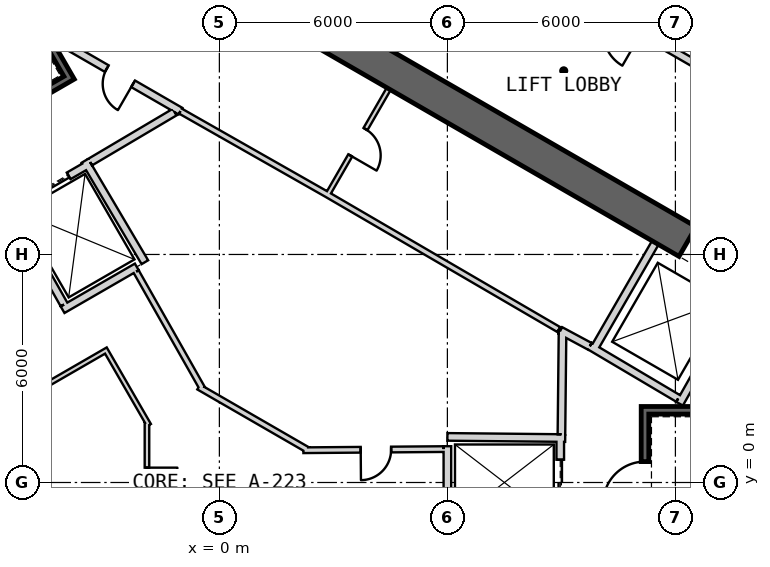
"""IFC4 building model, lengths in metres.
Left out: names, types, materials, properties, quantities, classifications, styles, units other than length and angle.
Written with IfcOpenShell. Run it as: python <this file> out.ifc"""

import sys

from ifc_helpers import new_model, si_unit, direction, frame, frame_2d, origin, place, context, subcontext, project, spatial, rectangle, extrude, element, fill, save


model = new_model("IFC4")
c1 = context("Model", 3, precision=1e-05, world=origin(), true_north=direction((0.0, 1.0)))
c2 = subcontext(c1, "Body", "Model", "MODEL_VIEW")
j1 = project(units=[si_unit("LENGTHUNIT", "METRE"), si_unit("PLANEANGLEUNIT", "RADIAN")], contexts=[c1])
p1 = place(None, origin())
s1 = spatial("IfcSite", under=j1, at=p1, CompositionType="ELEMENT")
p2 = place(p1, origin())
s2 = spatial("IfcBuilding", under=s1, at=p2, CompositionType="ELEMENT")
p3 = place(p2, frame((0.0, 0.0, 193.2)))
s3 = spatial("IfcBuildingStorey", under=s2, at=p3, CompositionType="ELEMENT", Elevation=193.2)
p4 = place(p3, frame((19.475, 2.208, 0.0), z_axis=(0.0, 0.0, 1.0), x_axis=(-0.866028369851, 0.499994862586, 0.0)))
e1 = element("IfcWall", 1, at=p4, inside=s3, PredefinedType="SHEAR", context=c2, shape_type="SweptSolid", body=[
    extrude(rectangle(XDim=31.523, YDim=0.9, at=frame_2d((15.762, 0.0))), origin(), (0.0, 0.0, 1.0), 4.0),
])
p5 = place(p4, frame((7.062, 0.0, 0.0)))
e2 = element("IfcOpeningElement", 2, at=p5, cuts=e1, PredefinedType="OPENING", context=c2, shape_type="SweptSolid", body=[
    extrude(rectangle(XDim=1.2, YDim=2.4, at=frame_2d((0.6, 1.2))), frame((0.0, 0.46, 0.0), z_axis=(0.0, -1.0, 0.0), x_axis=(1.0, 0.0, 0.0)), (0.0, 0.0, 1.0), 0.92),
])
p6 = place(p4, frame((3.612, 0.0, 0.0)))
e3 = element("IfcOpeningElement", 3, at=p6, cuts=e1, PredefinedType="OPENING", context=c2, shape_type="SweptSolid", body=[
    extrude(rectangle(XDim=1.2, YDim=2.4, at=frame_2d((0.6, 1.2))), frame((0.0, 0.46, 0.0), z_axis=(0.0, -1.0, 0.0), x_axis=(1.0, 0.0, 0.0)), (0.0, 0.0, 1.0), 0.92),
])
p7 = place(p4, frame((26.712, 0.0, 0.0)))
e4 = element("IfcOpeningElement", 4, at=p7, cuts=e1, PredefinedType="OPENING", context=c2, shape_type="SweptSolid", body=[
    extrude(rectangle(XDim=1.2, YDim=2.4, at=frame_2d((0.6, 1.2))), frame((0.0, 0.46, 0.0), z_axis=(0.0, -1.0, 0.0), x_axis=(1.0, 0.0, 0.0)), (0.0, 0.0, 1.0), 0.92),
])
p8 = place(p3, frame((9.847, 3.495, 0.0), z_axis=(0.0, 0.0, 1.0), x_axis=(0.499984717929, 0.866034226713, 0.0)))
e5 = element("IfcWall", 5, at=p8, inside=s3, PredefinedType="PLUMBINGWALL", context=c2, shape_type="SweptSolid", body=[
    extrude(rectangle(XDim=3.25, YDim=0.2, at=frame_2d((1.625, 0.0))), origin(), (0.0, 0.0, 1.0), 3.7),
])
p9 = place(p3, frame((12.11, 2.073, 0.0), z_axis=(0.0, 0.0, 1.0), x_axis=(0.49196600604, 0.870614408852, 0.0)))
e6 = element("IfcWall", 6, at=p9, inside=s3, PredefinedType="PLUMBINGWALL", context=c2, shape_type="SweptSolid", body=[
    extrude(rectangle(XDim=3.35, YDim=0.2, at=frame_2d((1.675, 0.0))), origin(), (0.0, 0.0, 1.0), 3.7),
])
p10 = place(p3, frame((12.073, 2.211, 0.0), z_axis=(0.0, 0.0, 1.0), x_axis=(-0.860414880418, 0.509594185166, 0.0)))
e7 = element("IfcWall", 7, at=p10, inside=s3, PredefinedType="PLUMBINGWALL", context=c2, shape_type="SweptSolid", body=[
    extrude(rectangle(XDim=2.7, YDim=0.2, at=frame_2d((1.35, 0.0))), origin(), (0.0, 0.0, 1.0), 3.7),
])
p11 = place(p3, frame((19.2, 1.9, -0.3), z_axis=(0.0, 0.0, 1.0), x_axis=(-1.0, 0.0, 0.0)))
e8 = element("IfcWall", 8, at=p11, inside=s3, PredefinedType="SHEAR", context=c2, shape_type="SweptSolid", body=[
    extrude(rectangle(XDim=8.1, YDim=0.2, at=frame_2d((4.05, 0.0))), origin(), (0.0, 0.0, 1.0), 4.0),
])
p12 = place(p3, frame((11.2, -1.8, -0.3), z_axis=(0.0, 0.0, 1.0), x_axis=(0.0, 1.0, 0.0)))
e9 = element("IfcWall", 9, at=p12, inside=s3, PredefinedType="SHEAR", context=c2, shape_type="SweptSolid", body=[
    extrude(rectangle(XDim=3.6, YDim=0.2, at=frame_2d((1.8, 0.0))), origin(), (0.0, 0.0, 1.0), 4.0),
])
p13 = place(p12, frame((1.25, 0.0, 0.3)))
e10 = element("IfcOpeningElement", 10, at=p13, cuts=e9, PredefinedType="OPENING", context=c2, shape_type="SweptSolid", body=[
    extrude(rectangle(XDim=1.1, YDim=2.1, at=frame_2d((0.55, 1.05))), frame((0.0, 0.11, 0.0), z_axis=(0.0, -1.0, 0.0), x_axis=(1.0, 0.0, 0.0)), (0.0, 0.0, 1.0), 0.22),
])
p14 = place(p3, frame((8.97, 1.2, 0.0), z_axis=(0.0, 0.0, 1.0), x_axis=(0.0, -1.0, 0.0)))
e11 = element("IfcWall", 11, at=p14, inside=s3, PredefinedType="PLUMBINGWALL", context=c2, shape_type="SweptSolid", body=[
    extrude(rectangle(XDim=2.4, YDim=0.2, at=frame_2d((1.2, 0.0))), origin(), (0.0, 0.0, 1.0), 3.7),
])
p15 = place(p14, frame((0.6, 0.0, 0.0)))
e12 = element("IfcOpeningElement", 12, at=p15, cuts=e11, PredefinedType="OPENING", context=c2, shape_type="SweptSolid", body=[
    extrude(rectangle(XDim=1.2, YDim=2.4, at=frame_2d((0.6, 1.2))), frame((0.0, 0.11, 0.0), z_axis=(0.0, -1.0, 0.0), x_axis=(1.0, 0.0, 0.0)), (0.0, 0.0, 1.0), 0.22),
])
p16 = place(p3, frame((6.0, 1.2, 0.0), z_axis=(0.0, 0.0, 1.0), x_axis=(0.999949988, -0.010001074852, 0.0)))
e13 = element("IfcWall", 13, at=p16, inside=s3, PredefinedType="PLUMBINGWALL", context=c2, shape_type="SweptSolid", body=[
    extrude(rectangle(XDim=3.1, YDim=0.2, at=frame_2d((1.55, 0.0))), origin(), (0.0, 0.0, 1.0), 3.7),
])
p17 = place(p3, frame((6.0, -1.1, 0.0), z_axis=(0.0, 0.0, 1.0), x_axis=(0.0, 1.0, 0.0)))
e14 = element("IfcWall", 14, at=p17, inside=s3, PredefinedType="PLUMBINGWALL", context=c2, shape_type="SweptSolid", body=[
    extrude(rectangle(XDim=2.055, YDim=0.2, at=frame_2d((1.027, 0.0))), origin(), (0.0, 0.0, 1.0), 3.7),
])
p18 = place(p3, frame((-7.854, 17.405, -0.3), z_axis=(0.0, 0.0, 1.0), x_axis=(0.499997992926, -0.866026562566, 0.0)))
e15 = element("IfcWall", 15, at=p18, inside=s3, PredefinedType="SHEAR", context=c2, shape_type="SweptSolid", body=[
    extrude(rectangle(XDim=7.9, YDim=0.2, at=frame_2d((3.95, 0.0))), origin(), (0.0, 0.0, 1.0), 4.0),
])
p19 = place(p3, frame((-7.159, 8.8, -0.3), z_axis=(0.0, 0.0, 1.0), x_axis=(0.866047807691, 0.499961193289, 0.0)))
e16 = element("IfcWall", 16, at=p19, inside=s3, PredefinedType="SHEAR", context=c2, shape_type="SweptSolid", body=[
    extrude(rectangle(XDim=3.6, YDim=0.2, at=frame_2d((1.8, 0.0))), origin(), (0.0, 0.0, 1.0), 4.0),
])
p20 = place(p19, frame((1.25, 0.0, 0.3)))
e17 = element("IfcOpeningElement", 17, at=p20, cuts=e16, PredefinedType="OPENING", context=c2, shape_type="SweptSolid", body=[
    extrude(rectangle(XDim=1.1, YDim=2.1, at=frame_2d((0.55, 1.05))), frame((0.0, 0.11, 0.0), z_axis=(0.0, -1.0, 0.0), x_axis=(1.0, 0.0, 0.0)), (0.0, 0.0, 1.0), 0.22),
])
p21 = place(p3, frame((-5.524, 7.168, 0.0), z_axis=(0.0, 0.0, 1.0), x_axis=(0.866024647952, 0.500001309137, 0.0)))
e18 = element("IfcWall", 18, at=p21, inside=s3, PredefinedType="PLUMBINGWALL", context=c2, shape_type="SweptSolid", body=[
    extrude(rectangle(XDim=2.4, YDim=0.2, at=frame_2d((1.2, 0.0))), origin(), (0.0, 0.0, 1.0), 3.7),
])
p22 = place(p21, frame((0.6, 0.0, 0.0)))
e19 = element("IfcOpeningElement", 19, at=p22, cuts=e18, PredefinedType="OPENING", context=c2, shape_type="SweptSolid", body=[
    extrude(rectangle(XDim=1.2, YDim=2.4, at=frame_2d((0.6, 1.2))), frame((0.0, 0.11, 0.0), z_axis=(0.0, -1.0, 0.0), x_axis=(1.0, 0.0, 0.0)), (0.0, 0.0, 1.0), 0.22),
])
p23 = place(p3, frame((-3.538, 8.465, 0.0), z_axis=(0.0, 0.0, 1.0), x_axis=(0.508647062354, -0.860975125052, 0.0)))
e20 = element("IfcWall", 20, at=p23, inside=s3, PredefinedType="PLUMBINGWALL", context=c2, shape_type="SweptSolid", body=[
    extrude(rectangle(XDim=3.1, YDim=0.2, at=frame_2d((1.55, 0.0))), origin(), (0.0, 0.0, 1.0), 3.7),
])
p24 = place(p3, frame((-2.173, 5.673, 0.0), z_axis=(0.0, 0.0, 1.0), x_axis=(-0.866028691075, -0.499994306202, 0.0)))
e21 = element("IfcWall", 21, at=p24, inside=s3, PredefinedType="PLUMBINGWALL", context=c2, shape_type="SweptSolid", body=[
    extrude(rectangle(XDim=2.254, YDim=0.2, at=frame_2d((1.127, 0.0))), origin(), (0.0, 0.0, 1.0), 3.7),
])
p25 = place(p3, frame((-5.562, 7.296, 0.0), z_axis=(0.0, 0.0, 1.0), x_axis=(0.49134651263, -0.870964180966, 0.0)))
e22 = element("IfcWall", 22, at=p25, inside=s3, PredefinedType="PLUMBINGWALL", context=c2, shape_type="SweptSolid", body=[
    extrude(rectangle(XDim=3.0, YDim=0.2, at=frame_2d((1.5, 0.0))), origin(), (0.0, 0.0, 1.0), 3.7),
])
p26 = place(p3, frame((4.457, 10.359, 0.0), z_axis=(0.0, 0.0, 1.0), x_axis=(-0.500017246033, -0.866015446554, 0.0)))
e23 = element("IfcWall", 23, at=p26, inside=s3, PredefinedType="PARTITIONING", context=c2, shape_type="SweptSolid", body=[
    extrude(rectangle(XDim=3.25, YDim=0.12, at=frame_2d((1.625, 0.0))), origin(), (0.0, 0.0, 1.0), 3.7),
])
p27 = place(p26, frame((1.225, 0.0, 0.0)))
e24 = element("IfcOpeningElement", 24, at=p27, cuts=e23, PredefinedType="OPENING", context=c2, shape_type="SweptSolid", body=[
    extrude(rectangle(XDim=0.8, YDim=2.1, at=frame_2d((0.4, 1.05))), frame((0.0, 0.07, 0.0), z_axis=(0.0, -1.0, 0.0), x_axis=(1.0, 0.0, 0.0)), (0.0, 0.0, 1.0), 0.14),
])
p28 = place(p3, frame((8.974, 3.999, 0.0), z_axis=(0.0, 0.0, 1.0), x_axis=(0.880917147855, -0.473270513147, 0.0)))
e25 = element("IfcWall", 25, at=p28, inside=s3, PredefinedType="PARTITIONING", context=c2, shape_type="SweptSolid", body=[
    extrude(rectangle(XDim=0.878, YDim=0.2, at=frame_2d((0.439, 0.0))), origin(), (0.0, 0.0, 1.0), 3.7),
])
p29 = place(p3, frame((8.931, 4.024, 0.0), z_axis=(0.0, 0.0, 1.0), x_axis=(-0.863936620311, 0.50360055211, 0.0)))
e26 = element("IfcWall", 26, at=p29, inside=s3, PredefinedType="PLUMBINGWALL", context=c2, shape_type="SweptSolid", body=[
    extrude(rectangle(XDim=7.072, YDim=0.15, at=frame_2d((3.536, 0.0))), origin(), (0.0, 0.0, 1.0), 3.7),
])
p30 = place(p3, frame((-4.296, 11.66, 0.0), z_axis=(0.0, 0.0, 1.0), x_axis=(0.866027389382, -0.499996560828, 0.0)))
e27 = element("IfcWall", 27, at=p30, inside=s3, PredefinedType="PARTITIONING", context=c2, shape_type="SweptSolid", body=[
    extrude(rectangle(XDim=3.778, YDim=0.2, at=frame_2d((1.889, 0.0))), origin(), (0.0, 0.0, 1.0), 3.7),
])
p31 = place(p30, frame((1.539, 0.0, 0.0)))
e28 = element("IfcOpeningElement", 28, at=p31, cuts=e27, PredefinedType="OPENING", context=c2, shape_type="SweptSolid", body=[
    extrude(rectangle(XDim=0.8, YDim=2.1, at=frame_2d((0.4, 1.05))), frame((0.0, 0.11, 0.0), z_axis=(0.0, -1.0, 0.0), x_axis=(1.0, 0.0, 0.0)), (0.0, 0.0, 1.0), 0.22),
])
p32 = place(p3, frame((2.821, 7.586, 0.0), z_axis=(0.0, 0.0, 1.0), x_axis=(-0.869355227283, 0.494187706035, 0.0)))
e29 = element("IfcWall", 29, at=p32, inside=s3, PredefinedType="PLUMBINGWALL", context=c2, shape_type="SweptSolid", body=[
    extrude(rectangle(XDim=4.423, YDim=0.15, at=frame_2d((2.211, 0.0))), origin(), (0.0, 0.0, 1.0), 3.7),
])
p33 = place(p3, frame((9.001, 1.27, 0.0), z_axis=(0.0, 0.0, 1.0), x_axis=(0.010747252091, 0.999942246619, 0.0)))
e30 = element("IfcWall", 30, at=p33, inside=s3, PredefinedType="PARTITIONING", context=c2, shape_type="SweptSolid", body=[
    extrude(rectangle(XDim=2.726, YDim=0.2, at=frame_2d((1.363, 0.0))), origin(), (0.0, 0.0, 1.0), 3.7),
])
p34 = place(p3, frame((-1.179, 9.745, 0.0), z_axis=(0.0, 0.0, 1.0), x_axis=(-0.860630814782, -0.509229418482, 0.0)))
e31 = element("IfcWall", 31, at=p34, inside=s3, PredefinedType="PARTITIONING", context=c2, shape_type="SweptSolid", body=[
    extrude(rectangle(XDim=2.582, YDim=0.2, at=frame_2d((1.291, 0.0))), origin(), (0.0, 0.0, 1.0), 3.7),
])
p35 = place(p3, frame((2.211, 0.849, 0.0), z_axis=(0.0, 0.0, 1.0), x_axis=(0.999967410175, 0.00807332566, 0.0)))
e32 = element("IfcWall", 32, at=p35, inside=s3, PredefinedType="PLUMBINGWALL", context=c2, shape_type="SweptSolid", body=[
    extrude(rectangle(XDim=3.689, YDim=0.15, at=frame_2d((1.845, 0.0))), origin(), (0.0, 0.0, 1.0), 3.7),
])
p36 = place(p35, frame((1.508, 0.0, 0.0)))
e33 = element("IfcOpeningElement", 33, at=p36, cuts=e32, PredefinedType="OPENING", context=c2, shape_type="SweptSolid", body=[
    extrude(rectangle(XDim=0.8, YDim=2.1, at=frame_2d((0.4, 1.05))), frame((0.0, 0.085, 0.0), z_axis=(0.0, -1.0, 0.0), x_axis=(1.0, 0.0, 0.0)), (0.0, 0.0, 1.0), 0.17),
])
p37 = place(p3, frame((-0.543, 2.514, 0.0), z_axis=(0.0, 0.0, 1.0), x_axis=(0.866042846705, -0.499969786758, 0.0)))
e34 = element("IfcWall", 34, at=p37, inside=s3, PredefinedType="PLUMBINGWALL", context=c2, shape_type="SweptSolid", body=[
    extrude(rectangle(XDim=3.304, YDim=0.15, at=frame_2d((1.652, 0.0))), origin(), (0.0, 0.0, 1.0), 3.7),
])
p38 = place(p3, frame((-2.189, 5.549, 0.0), z_axis=(0.0, 0.0, 1.0), x_axis=(0.49303694679, -0.870008373006, 0.0)))
e35 = element("IfcWall", 35, at=p38, inside=s3, PredefinedType="PLUMBINGWALL", context=c2, shape_type="SweptSolid", body=[
    extrude(rectangle(XDim=3.538, YDim=0.15, at=frame_2d((1.769, 0.0))), origin(), (0.0, 0.0, 1.0), 3.7),
])
p39 = place(p3, frame((-2.934, 3.502, 0.0), z_axis=(0.0, 0.0, 1.0), x_axis=(-0.866039121236, -0.499976239924, 0.0)))
e36 = element("IfcWall", 36, at=p39, inside=s3, PredefinedType="PARTITIONING", context=c2, shape_type="SweptSolid", body=[
    extrude(rectangle(XDim=1.971, YDim=0.12, at=frame_2d((0.985, 0.0))), origin(), (0.0, 0.0, 1.0), 3.7),
])
p40 = place(p3, frame((-1.853, 1.51, 0.0), z_axis=(0.0, 0.0, 1.0), x_axis=(-0.499984350684, 0.866034438732, 0.0)))
e37 = element("IfcWall", 37, at=p40, inside=s3, PredefinedType="PARTITIONING", context=c2, shape_type="SweptSolid", body=[
    extrude(rectangle(XDim=2.206, YDim=0.12, at=frame_2d((1.103, 0.0))), origin(), (0.0, 0.0, 1.0), 3.7),
])
p41 = place(p3, frame((-1.905, -1.704, 0.0), z_axis=(0.0, 0.0, 1.0), x_axis=(0.0, 1.0, 0.0)))
e38 = element("IfcWall", 38, at=p41, inside=s3, PredefinedType="PARTITIONING", context=c2, shape_type="SweptSolid", body=[
    extrude(rectangle(XDim=3.285, YDim=0.12, at=frame_2d((1.643, 0.0))), origin(), (0.0, 0.0, 1.0), 3.7),
])
p42 = place(p41, frame((1.295, 0.0, 0.0)))
e39 = element("IfcOpeningElement", 39, at=p42, cuts=e38, PredefinedType="OPENING", context=c2, shape_type="SweptSolid", body=[
    extrude(rectangle(XDim=0.8, YDim=2.1, at=frame_2d((0.4, 1.05))), frame((0.0, 0.07, 0.0), z_axis=(0.0, -1.0, 0.0), x_axis=(1.0, 0.0, 0.0)), (0.0, 0.0, 1.0), 0.14),
])
p43 = place(p3, frame((22.27, 5.386, 0.0), z_axis=(0.0, 0.0, 1.0), x_axis=(-0.866019551165, 0.500010136897, 0.0)))
e40 = element("IfcWall", 40, at=p43, inside=s3, PredefinedType="PARTITIONING", context=c2, shape_type="SweptSolid", body=[
    extrude(rectangle(XDim=12.243, YDim=0.2, at=frame_2d((6.122, 0.0))), origin(), (0.0, 0.0, 1.0), 2.88),
])
p44 = place(p13, origin())
e41 = element("IfcDoor", 41, at=p44, inside=s3, OperationType="SINGLE_SWING_LEFT", PredefinedType="USERDEFINED", context=c2, shape_type="SweptSolid", body=[
    extrude(rectangle(XDim=1.1, YDim=2.1, at=frame_2d((0.55, 1.05))), frame((0.0, 0.025, 0.0), z_axis=(0.0, -1.0, 0.0), x_axis=(1.0, 0.0, 0.0)), (0.0, 0.0, 1.0), 0.05),
])
fill(e10, e41)
p45 = place(p15, origin())
e42 = element("IfcDoor", 42, at=p45, inside=s3, OperationType="SLIDING_TO_LEFT", PredefinedType="USERDEFINED", context=c2, shape_type="SweptSolid", body=[
    extrude(rectangle(XDim=1.2, YDim=2.4, at=frame_2d((0.6, 1.2))), frame((0.0, 0.025, 0.0), z_axis=(0.0, -1.0, 0.0), x_axis=(1.0, 0.0, 0.0)), (0.0, 0.0, 1.0), 0.05),
])
fill(e12, e42)
p46 = place(p22, origin())
e43 = element("IfcDoor", 43, at=p46, inside=s3, OperationType="SLIDING_TO_LEFT", PredefinedType="USERDEFINED", context=c2, shape_type="SweptSolid", body=[
    extrude(rectangle(XDim=1.2, YDim=2.4, at=frame_2d((0.6, 1.2))), frame((0.0, 0.025, 0.0), z_axis=(0.0, -1.0, 0.0), x_axis=(1.0, 0.0, 0.0)), (0.0, 0.0, 1.0), 0.05),
])
fill(e19, e43)
p47 = place(p36, origin())
e44 = element("IfcDoor", 44, at=p47, inside=s3, OperationType="SINGLE_SWING_LEFT", PredefinedType="USERDEFINED", context=c2, shape_type="SweptSolid", body=[
    extrude(rectangle(XDim=0.8, YDim=2.1, at=frame_2d((0.4, 1.05))), frame((0.0, 0.025, 0.0), z_axis=(0.0, -1.0, 0.0), x_axis=(1.0, 0.0, 0.0)), (0.0, 0.0, 1.0), 0.05),
])
fill(e33, e44)
p48 = place(p42, origin())
e45 = element("IfcDoor", 45, at=p48, inside=s3, OperationType="SINGLE_SWING_LEFT", PredefinedType="USERDEFINED", context=c2, shape_type="SweptSolid", body=[
    extrude(rectangle(XDim=0.8, YDim=2.1, at=frame_2d((0.4, 1.05))), frame((0.0, 0.025, 0.0), z_axis=(0.0, -1.0, 0.0), x_axis=(1.0, 0.0, 0.0)), (0.0, 0.0, 1.0), 0.05),
])
fill(e39, e45)
p49 = place(p27, origin())
e46 = element("IfcDoor", 46, at=p49, inside=s3, OperationType="SINGLE_SWING_RIGHT", PredefinedType="USERDEFINED", context=c2, shape_type="SweptSolid", body=[
    extrude(rectangle(XDim=0.8, YDim=2.1, at=frame_2d((0.4, 1.05))), frame((0.0, 0.025, 0.0), z_axis=(0.0, -1.0, 0.0), x_axis=(1.0, 0.0, 0.0)), (0.0, 0.0, 1.0), 0.05),
])
fill(e24, e46)
p50 = place(p31, origin())
e47 = element("IfcDoor", 47, at=p50, inside=s3, OperationType="SINGLE_SWING_LEFT", PredefinedType="USERDEFINED", context=c2, shape_type="SweptSolid", body=[
    extrude(rectangle(XDim=0.8, YDim=2.1, at=frame_2d((0.4, 1.05))), frame((0.0, 0.025, 0.0), z_axis=(0.0, -1.0, 0.0), x_axis=(1.0, 0.0, 0.0)), (0.0, 0.0, 1.0), 0.05),
])
fill(e28, e47)
p51 = place(p5, origin())
e48 = element("IfcDoor", 48, at=p51, inside=s3, OperationType="SLIDING_TO_LEFT", PredefinedType="USERDEFINED", context=c2, shape_type="SweptSolid", body=[
    extrude(rectangle(XDim=1.2, YDim=2.4, at=frame_2d((0.6, 1.2))), frame((0.0, 0.025, 0.0), z_axis=(0.0, -1.0, 0.0), x_axis=(1.0, 0.0, 0.0)), (0.0, 0.0, 1.0), 0.05),
])
fill(e2, e48)
save(model, sys.argv[1])
